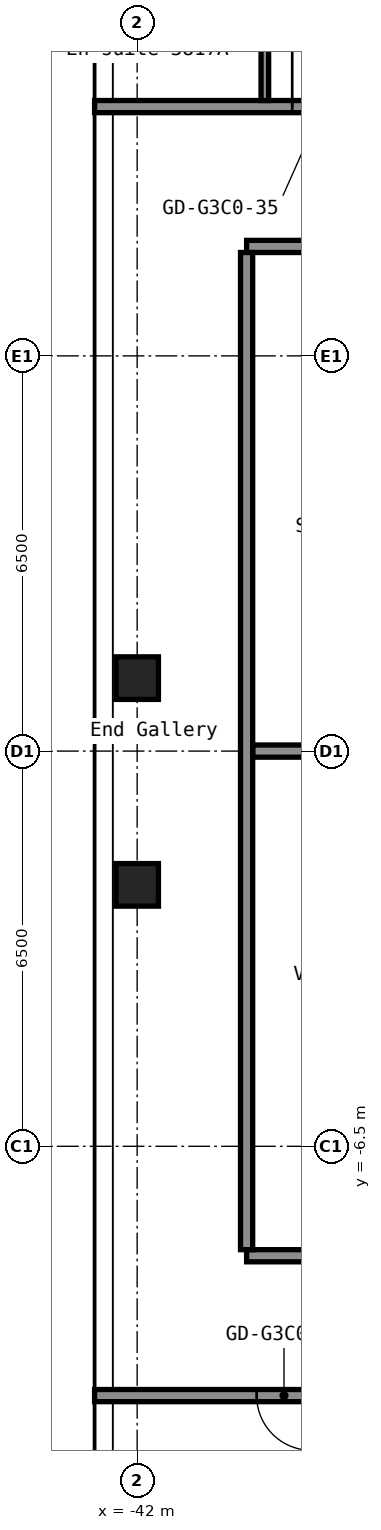
"""IFC4 building model, lengths in metres.
Left out: names, types, materials, properties, quantities, classifications, styles, units other than length and angle.
Written with IfcOpenShell. Run it as: python <this file> out.ifc"""

import sys

from ifc_helpers import new_model, si_unit, direction, frame, frame_2d, origin, origin_2d, place, context, subcontext, project, spatial, rectangle, hollow_rectangle, extrude, element, fill, save


model = new_model("IFC4")
c1 = context("Model", 3, precision=1e-05, world=origin(), true_north=direction((0.0, 1.0)))
c2 = subcontext(c1, "Body", "Model", "MODEL_VIEW")
j1 = project(units=[si_unit("LENGTHUNIT", "METRE"), si_unit("PLANEANGLEUNIT", "RADIAN")], contexts=[c1])
p1 = place(None, origin())
s1 = spatial("IfcSite", under=j1, at=p1, CompositionType="ELEMENT")
p2 = place(p1, origin())
s2 = spatial("IfcBuilding", under=s1, at=p2, CompositionType="ELEMENT")
p3 = place(p2, frame((0.0, 0.0, 137.4)))
s3 = spatial("IfcBuildingStorey", under=s2, at=p3, CompositionType="ELEMENT", Elevation=137.4)
for number, where, z_axis, x_axis in (
    (1, (-42.0, -2.2, 0.0), (0.0, 0.0, 1.0), (1.0, 0.0, 0.0)),
    (2, (-42.0, 1.2, 0.0), (0.0, 0.0, 1.0), (1.0, 0.0, 0.0)),
):
    element("IfcColumn", number, at=place(p3, frame(where, z_axis=z_axis, x_axis=x_axis)), inside=s3, PredefinedType="COLUMN", context=c2, shape_type="SweptSolid", body=[
        extrude(hollow_rectangle(XDim=0.7, YDim=0.7, WallThickness=0.028, at=origin_2d()), origin(), (0.0, 0.0, 1.0), 2.75),
    ])
p4 = place(p3, frame((-42.7, -10.6, 0.0), z_axis=(0.0, 0.0, 1.0), x_axis=(1.0, 0.0, 0.0)))
e3 = element("IfcWall", 3, at=p4, inside=s3, PredefinedType="PARTITIONING", context=c2, shape_type="SweptSolid", body=[
    extrude(rectangle(XDim=25.9, YDim=0.2, at=frame_2d((12.95, 0.0))), origin(), (0.0, 0.0, 1.0), 2.75),
])
p5 = place(p4, frame((2.665, 0.0, 0.0)))
e4 = element("IfcOpeningElement", 4, at=p5, cuts=e3, PredefinedType="OPENING", context=c2, shape_type="SweptSolid", body=[
    extrude(rectangle(XDim=0.9, YDim=2.1, at=frame_2d((0.45, 1.05))), frame((0.0, 0.11, 0.0), z_axis=(0.0, -1.0, 0.0), x_axis=(1.0, 0.0, 0.0)), (0.0, 0.0, 1.0), 0.22),
])
p6 = place(p4, frame((7.065, 0.0, 0.0)))
e5 = element("IfcOpeningElement", 5, at=p6, cuts=e3, PredefinedType="OPENING", context=c2, shape_type="SweptSolid", body=[
    extrude(rectangle(XDim=0.9, YDim=2.1, at=frame_2d((0.45, 1.05))), frame((0.0, 0.11, 0.0), z_axis=(0.0, -1.0, 0.0), x_axis=(1.0, 0.0, 0.0)), (0.0, 0.0, 1.0), 0.22),
])
p7 = place(p4, frame((12.8, 0.0, 0.0)))
e6 = element("IfcOpeningElement", 6, at=p7, cuts=e3, PredefinedType="OPENING", context=c2, shape_type="SweptSolid", body=[
    extrude(rectangle(XDim=1.0, YDim=2.1, at=frame_2d((0.5, 1.05))), frame((0.0, 0.11, 0.0), z_axis=(0.0, -1.0, 0.0), x_axis=(1.0, 0.0, 0.0)), (0.0, 0.0, 1.0), 0.22),
])
p8 = place(p4, frame((21.2, 0.0, 0.0)))
e7 = element("IfcOpeningElement", 7, at=p8, cuts=e3, PredefinedType="OPENING", context=c2, shape_type="SweptSolid", body=[
    extrude(rectangle(XDim=1.0, YDim=2.1, at=frame_2d((0.5, 1.05))), frame((0.0, 0.11, 0.0), z_axis=(0.0, -1.0, 0.0), x_axis=(1.0, 0.0, 0.0)), (0.0, 0.0, 1.0), 0.22),
])
p9 = place(p3, frame((-40.2, -8.3, 0.0), z_axis=(0.0, 0.0, 1.0), x_axis=(1.0, 0.0, 0.0)))
e8 = element("IfcWall", 8, at=p9, inside=s3, PredefinedType="PARTITIONING", context=c2, shape_type="SweptSolid", body=[
    extrude(rectangle(XDim=6.6, YDim=0.2, at=frame_2d((3.3, 0.0))), origin(), (0.0, 0.0, 1.0), 2.75),
])
p10 = place(p9, frame((1.465, 0.0, 0.0)))
e9 = element("IfcOpeningElement", 9, at=p10, cuts=e8, PredefinedType="OPENING", context=c2, shape_type="SweptSolid", body=[
    extrude(rectangle(XDim=0.9, YDim=2.1, at=frame_2d((0.45, 1.05))), frame((0.0, 0.11, 0.0), z_axis=(0.0, -1.0, 0.0), x_axis=(1.0, 0.0, 0.0)), (0.0, 0.0, 1.0), 0.22),
])
p11 = place(p9, frame((4.765, 0.0, 0.0)))
e10 = element("IfcOpeningElement", 10, at=p11, cuts=e8, PredefinedType="OPENING", context=c2, shape_type="SweptSolid", body=[
    extrude(rectangle(XDim=0.9, YDim=2.1, at=frame_2d((0.45, 1.05))), frame((0.0, 0.11, 0.0), z_axis=(0.0, -1.0, 0.0), x_axis=(1.0, 0.0, 0.0)), (0.0, 0.0, 1.0), 0.22),
])
p12 = place(p3, frame((-40.1, 0.0, 0.0), z_axis=(0.0, 0.0, 1.0), x_axis=(1.0, 0.0, 0.0)))
e11 = element("IfcWall", 11, at=p12, inside=s3, PredefinedType="PARTITIONING", context=c2, shape_type="SweptSolid", body=[
    extrude(rectangle(XDim=6.5, YDim=0.2, at=frame_2d((3.25, 0.0))), origin(), (0.0, 0.0, 1.0), 2.75),
])
p13 = place(p3, frame((-40.2, 8.3, 0.0), z_axis=(0.0, 0.0, 1.0), x_axis=(1.0, 0.0, 0.0)))
e12 = element("IfcWall", 12, at=p13, inside=s3, PredefinedType="PARTITIONING", context=c2, shape_type="SweptSolid", body=[
    extrude(rectangle(XDim=6.6, YDim=0.2, at=frame_2d((3.3, 0.0))), origin(), (0.0, 0.0, 1.0), 2.75),
])
p14 = place(p13, frame((1.595, 0.0, 0.0)))
e13 = element("IfcOpeningElement", 13, at=p14, cuts=e12, PredefinedType="OPENING", context=c2, shape_type="SweptSolid", body=[
    extrude(rectangle(XDim=0.9, YDim=2.1, at=frame_2d((0.45, 1.05))), frame((0.0, 0.11, 0.0), z_axis=(0.0, -1.0, 0.0), x_axis=(1.0, 0.0, 0.0)), (0.0, 0.0, 1.0), 0.22),
])
p15 = place(p13, frame((4.895, 0.0, 0.0)))
e14 = element("IfcOpeningElement", 14, at=p15, cuts=e12, PredefinedType="OPENING", context=c2, shape_type="SweptSolid", body=[
    extrude(rectangle(XDim=0.9, YDim=2.1, at=frame_2d((0.45, 1.05))), frame((0.0, 0.11, 0.0), z_axis=(0.0, -1.0, 0.0), x_axis=(1.0, 0.0, 0.0)), (0.0, 0.0, 1.0), 0.22),
])
p16 = place(p3, frame((-42.7, 10.6, 0.0), z_axis=(0.0, 0.0, 1.0), x_axis=(1.0, 0.0, 0.0)))
e15 = element("IfcWall", 15, at=p16, inside=s3, PredefinedType="PARTITIONING", context=c2, shape_type="SweptSolid", body=[
    extrude(rectangle(XDim=25.9, YDim=0.2, at=frame_2d((12.95, 0.0))), origin(), (0.0, 0.0, 1.0), 2.75),
])
p17 = place(p16, frame((3.25, 0.0, 0.0)))
e16 = element("IfcOpeningElement", 16, at=p17, cuts=e15, PredefinedType="OPENING", context=c2, shape_type="SweptSolid", body=[
    extrude(rectangle(XDim=1.0, YDim=2.1, at=frame_2d((0.5, 1.05))), frame((0.0, 0.11, 0.0), z_axis=(0.0, -1.0, 0.0), x_axis=(1.0, 0.0, 0.0)), (0.0, 0.0, 1.0), 0.22),
])
p18 = place(p16, frame((5.15, 0.0, 0.0)))
e17 = element("IfcOpeningElement", 17, at=p18, cuts=e15, PredefinedType="OPENING", context=c2, shape_type="SweptSolid", body=[
    extrude(rectangle(XDim=1.0, YDim=2.1, at=frame_2d((0.5, 1.05))), frame((0.0, 0.11, 0.0), z_axis=(0.0, -1.0, 0.0), x_axis=(1.0, 0.0, 0.0)), (0.0, 0.0, 1.0), 0.22),
])
p19 = place(p16, frame((11.1, 0.0, 0.0)))
e18 = element("IfcOpeningElement", 18, at=p19, cuts=e15, PredefinedType="OPENING", context=c2, shape_type="SweptSolid", body=[
    extrude(rectangle(XDim=1.0, YDim=2.1, at=frame_2d((0.5, 1.05))), frame((0.0, 0.11, 0.0), z_axis=(0.0, -1.0, 0.0), x_axis=(1.0, 0.0, 0.0)), (0.0, 0.0, 1.0), 0.22),
])
p20 = place(p16, frame((20.35, 0.0, 0.0)))
e19 = element("IfcOpeningElement", 19, at=p20, cuts=e15, PredefinedType="OPENING", context=c2, shape_type="SweptSolid", body=[
    extrude(rectangle(XDim=1.0, YDim=2.1, at=frame_2d((0.5, 1.05))), frame((0.0, 0.11, 0.0), z_axis=(0.0, -1.0, 0.0), x_axis=(1.0, 0.0, 0.0)), (0.0, 0.0, 1.0), 0.22),
])
p21 = place(p16, frame((22.05, 0.0, 0.0)))
e20 = element("IfcOpeningElement", 20, at=p21, cuts=e15, PredefinedType="OPENING", context=c2, shape_type="SweptSolid", body=[
    extrude(rectangle(XDim=1.0, YDim=2.1, at=frame_2d((0.5, 1.05))), frame((0.0, 0.11, 0.0), z_axis=(0.0, -1.0, 0.0), x_axis=(1.0, 0.0, 0.0)), (0.0, 0.0, 1.0), 0.22),
])
p22 = place(p3, frame((-40.2, -8.2, 0.0), z_axis=(0.0, 0.0, 1.0), x_axis=(0.0, 1.0, 0.0)))
e21 = element("IfcWall", 21, at=p22, inside=s3, PredefinedType="PARTITIONING", context=c2, shape_type="SweptSolid", body=[
    extrude(rectangle(XDim=16.4, YDim=0.2, at=frame_2d((8.2, 0.0))), origin(), (0.0, 0.0, 1.0), 2.75),
])
p23 = place(p3, frame((-39.9, 10.7, 0.0), z_axis=(0.0, 0.0, 1.0), x_axis=(0.0, 1.0, 0.0)))
e22 = element("IfcWall", 22, at=p23, inside=s3, PredefinedType="PARTITIONING", context=c2, shape_type="SweptSolid", body=[
    extrude(rectangle(XDim=2.9, YDim=0.125, at=frame_2d((1.45, 0.0))), origin(), (0.0, 0.0, 1.0), 2.75),
])
p24 = place(p23, frame((1.5, 0.0, 0.0)))
e23 = element("IfcOpeningElement", 23, at=p24, cuts=e22, PredefinedType="OPENING", context=c2, shape_type="SweptSolid", body=[
    extrude(rectangle(XDim=0.8, YDim=2.1, at=frame_2d((0.4, 1.05))), frame((0.0, 0.073, 0.0), z_axis=(0.0, -1.0, 0.0), x_axis=(1.0, 0.0, 0.0)), (0.0, 0.0, 1.0), 0.145),
])
p25 = place(p5, origin())
e24 = element("IfcDoor", 24, at=p25, inside=s3, OperationType="SINGLE_SWING_RIGHT", PredefinedType="DOOR", context=c2, shape_type="SweptSolid", body=[
    extrude(rectangle(XDim=0.9, YDim=2.1, at=frame_2d((0.45, 1.05))), frame((0.0, 0.025, 0.0), z_axis=(0.0, -1.0, 0.0), x_axis=(1.0, 0.0, 0.0)), (0.0, 0.0, 1.0), 0.05),
])
fill(e4, e24)
p26 = place(p17, origin())
e25 = element("IfcDoor", 25, at=p26, inside=s3, OperationType="SINGLE_SWING_RIGHT", PredefinedType="DOOR", context=c2, shape_type="SweptSolid", body=[
    extrude(rectangle(XDim=1.0, YDim=2.1, at=frame_2d((0.5, 1.05))), frame((0.0, 0.025, 0.0), z_axis=(0.0, -1.0, 0.0), x_axis=(1.0, 0.0, 0.0)), (0.0, 0.0, 1.0), 0.05),
])
fill(e16, e25)
save(model, sys.argv[1])
